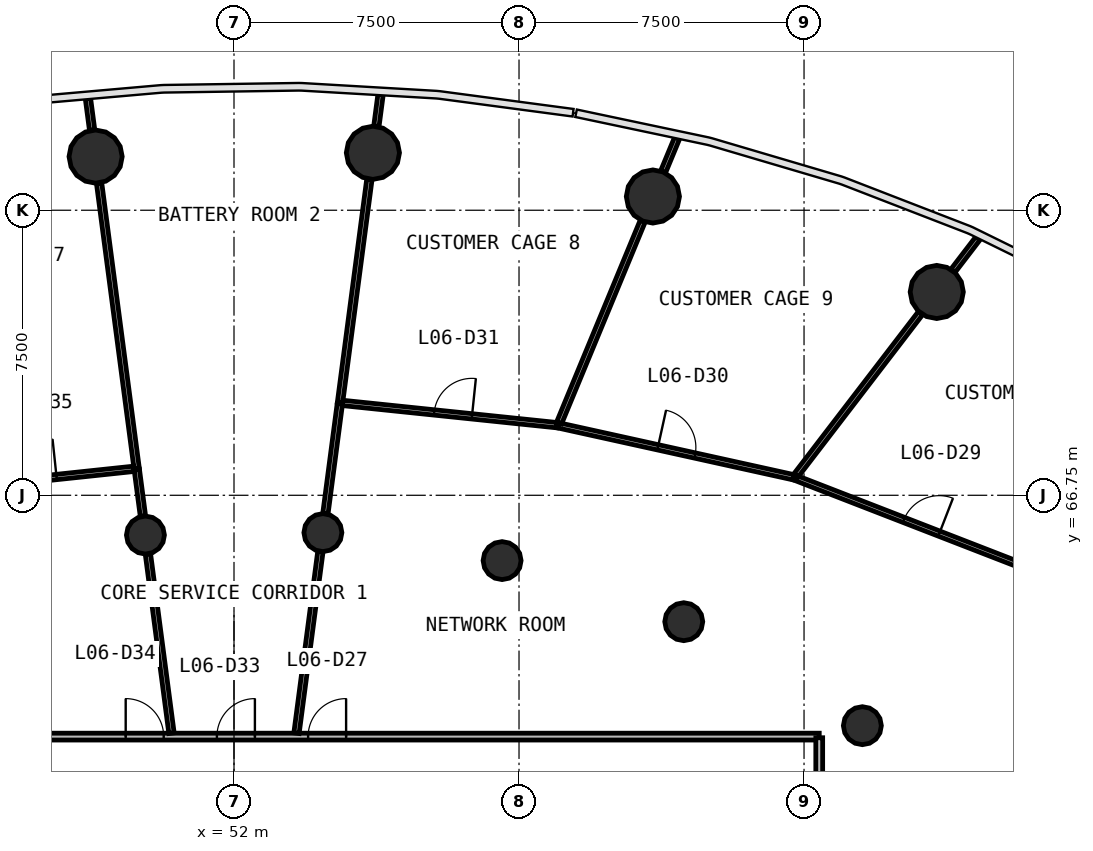
"""IFC4 building model, lengths in metres.
Left out: names, types, materials, properties, quantities, classifications, styles, units other than length and angle.
Written with IfcOpenShell. Run it as: python <this file> out.ifc"""

import sys

from ifc_helpers import new_model, si_unit, direction, frame, frame_2d, origin, origin_2d, place, context, subcontext, project, spatial, rectangle, circle, extrude, source, transform, mapped, element, fill, save


model = new_model("IFC4")
c1 = context("Model", 3, precision=1e-05, world=origin(), true_north=direction((0.0, 1.0)))
c2 = subcontext(c1, "Body", "Model", "MODEL_VIEW")
j1 = project(units=[si_unit("LENGTHUNIT", "METRE"), si_unit("PLANEANGLEUNIT", "RADIAN")], contexts=[c1])
p1 = place(None, origin())
s1 = spatial("IfcSite", under=j1, at=p1, CompositionType="ELEMENT")
p2 = place(p1, origin())
s2 = spatial("IfcBuilding", under=s1, at=p2, CompositionType="ELEMENT")
p3 = place(p2, frame((0.0, 0.0, 27.0)))
s3 = spatial("IfcBuildingStorey", under=s2, at=p3, CompositionType="ELEMENT", Elevation=27.0)
m1 = source(origin(), c2, "Body", "SweptSolid", [
    extrude(circle(Radius=0.7, at=origin_2d()), origin(), (0.0, 0.0, 1.0), 4.4),
])
for number, where, z_axis, x_axis in (
    (1, (70.492, 72.1, 0.0), (0.0, 0.0, 1.0), (1.0, 0.0, 0.0)),
    (2, (63.023, 74.611, 0.0), (0.0, 0.0, 1.0), (1.0, 0.0, 0.0)),
    (3, (55.655, 75.761, 0.0), (0.0, 0.0, 1.0), (1.0, 0.0, 0.0)),
    (4, (48.358, 75.661, 0.0), (0.0, 0.0, 1.0), (1.0, 0.0, 0.0)),
):
    element("IfcColumn", number, at=place(p3, frame(where, z_axis=z_axis, x_axis=x_axis)), inside=s3, PredefinedType="COLUMN", context=c2, shape_type="MappedRepresentation", body=[
        mapped(m1, transform((0.0, 0.0, 0.0), scale=1.0)),
    ])
m2 = source(origin(), c2, "Body", "SweptSolid", [
    extrude(circle(Radius=0.5, at=origin_2d()), origin(), (0.0, 0.0, 1.0), 4.4),
])
for number, where, z_axis, x_axis in (
    (5, (68.535, 60.688, 0.0), (0.0, 0.0, 1.0), (1.0, 0.0, 0.0)),
    (6, (63.835, 63.424, 0.0), (0.0, 0.0, 1.0), (1.0, 0.0, 0.0)),
    (7, (59.055, 65.031, 0.0), (0.0, 0.0, 1.0), (1.0, 0.0, 0.0)),
    (8, (54.339, 65.767, 0.0), (0.0, 0.0, 1.0), (1.0, 0.0, 0.0)),
    (9, (49.669, 65.703, 0.0), (0.0, 0.0, 1.0), (1.0, 0.0, 0.0)),
):
    element("IfcColumn", number, at=place(p3, frame(where, z_axis=z_axis, x_axis=x_axis)), inside=s3, PredefinedType="COLUMN", context=c2, shape_type="MappedRepresentation", body=[
        mapped(m2, transform((0.0, 0.0, 0.0), scale=1.0)),
    ])
p4 = place(p3, frame((36.6, 60.4, 0.0), z_axis=(0.0, 0.0, 1.0), x_axis=(1.0, 0.0, 0.0)))
e10 = element("IfcWall", 10, at=p4, inside=s3, PredefinedType="PARTITIONING", context=c2, shape_type="SweptSolid", body=[
    extrude(rectangle(XDim=30.8, YDim=0.18, at=frame_2d((15.4, 0.0))), origin(), (0.0, 0.0, 1.0), 3.05),
])
p5 = place(p4, frame((17.35, 0.0, 0.0)))
e11 = element("IfcOpeningElement", 11, at=p5, cuts=e10, PredefinedType="OPENING", context=c2, shape_type="SweptSolid", body=[
    extrude(rectangle(XDim=1.0, YDim=2.1, at=frame_2d((0.5, 1.05))), frame((0.0, 0.1, 0.0), z_axis=(0.0, -1.0, 0.0), x_axis=(1.0, 0.0, 0.0)), (0.0, 0.0, 1.0), 0.2),
])
p6 = place(p4, frame((14.95, 0.0, 0.0)))
e12 = element("IfcOpeningElement", 12, at=p6, cuts=e10, PredefinedType="OPENING", context=c2, shape_type="SweptSolid", body=[
    extrude(rectangle(XDim=1.0, YDim=2.1, at=frame_2d((0.5, 1.05))), frame((0.0, 0.1, 0.0), z_axis=(0.0, -1.0, 0.0), x_axis=(1.0, 0.0, 0.0)), (0.0, 0.0, 1.0), 0.2),
])
p7 = place(p4, frame((12.55, 0.0, 0.0)))
e13 = element("IfcOpeningElement", 13, at=p7, cuts=e10, PredefinedType="OPENING", context=c2, shape_type="SweptSolid", body=[
    extrude(rectangle(XDim=1.0, YDim=2.1, at=frame_2d((0.5, 1.05))), frame((0.0, 0.1, 0.0), z_axis=(0.0, -1.0, 0.0), x_axis=(1.0, 0.0, 0.0)), (0.0, 0.0, 1.0), 0.2),
])
p8 = place(p3, frame((67.4, 60.37, 0.0), z_axis=(0.0, 0.0, 1.0), x_axis=(0.0, -1.0, 0.0)))
e14 = element("IfcWall", 14, at=p8, inside=s3, PredefinedType="PARTITIONING", context=c2, shape_type="SweptSolid", body=[
    extrude(rectangle(XDim=23.583, YDim=0.18, at=frame_2d((11.791, 0.0))), origin(), (0.0, 0.0, 1.0), 3.05),
])
p9 = place(p8, frame((11.833, 0.0, 0.0)))
e15 = element("IfcOpeningElement", 15, at=p9, cuts=e14, PredefinedType="OPENING", context=c2, shape_type="SweptSolid", body=[
    extrude(rectangle(XDim=0.9, YDim=2.1, at=frame_2d((0.45, 1.05))), frame((0.0, 0.1, 0.0), z_axis=(0.0, -1.0, 0.0), x_axis=(1.0, 0.0, 0.0)), (0.0, 0.0, 1.0), 0.2),
])
p10 = place(p8, frame((10.433, 0.0, 0.0)))
e16 = element("IfcOpeningElement", 16, at=p10, cuts=e14, PredefinedType="OPENING", context=c2, shape_type="SweptSolid", body=[
    extrude(rectangle(XDim=0.9, YDim=2.1, at=frame_2d((0.45, 1.05))), frame((0.0, 0.1, 0.0), z_axis=(0.0, -1.0, 0.0), x_axis=(1.0, 0.0, 0.0)), (0.0, 0.0, 1.0), 0.2),
])
p11 = place(p8, frame((7.833, 0.0, 0.0)))
e17 = element("IfcOpeningElement", 17, at=p11, cuts=e14, PredefinedType="OPENING", context=c2, shape_type="SweptSolid", body=[
    extrude(rectangle(XDim=0.9, YDim=2.1, at=frame_2d((0.45, 1.05))), frame((0.0, 0.1, 0.0), z_axis=(0.0, -1.0, 0.0), x_axis=(1.0, 0.0, 0.0)), (0.0, 0.0, 1.0), 0.2),
])
p12 = place(p8, frame((19.133, 0.0, 0.0)))
e18 = element("IfcOpeningElement", 18, at=p12, cuts=e14, PredefinedType="OPENING", context=c2, shape_type="SweptSolid", body=[
    extrude(rectangle(XDim=1.0, YDim=2.1, at=frame_2d((0.5, 1.05))), frame((0.0, 0.1, 0.0), z_axis=(0.0, -1.0, 0.0), x_axis=(1.0, 0.0, 0.0)), (0.0, 0.0, 1.0), 0.2),
])
p13 = place(p8, frame((14.732, 0.0, 0.0)))
e19 = element("IfcOpeningElement", 19, at=p13, cuts=e14, PredefinedType="OPENING", context=c2, shape_type="SweptSolid", body=[
    extrude(rectangle(XDim=1.0, YDim=2.1, at=frame_2d((0.5, 1.05))), frame((0.0, 0.1, 0.0), z_axis=(0.0, -1.0, 0.0), x_axis=(1.0, 0.0, 0.0)), (0.0, 0.0, 1.0), 0.2),
])
p14 = place(p3, frame((49.439, 67.454, 0.0), z_axis=(0.0, 0.0, 1.0), x_axis=(-0.130518718584, 0.991445845268, 0.0)))
e20 = element("IfcWall", 20, at=p14, inside=s3, PredefinedType="PARTITIONING", context=c2, shape_type="SweptSolid", body=[
    extrude(rectangle(XDim=7.574, YDim=0.14, at=frame_2d((3.787, 0.0))), origin(), (0.0, 0.0, 1.0), 3.05),
])
p15 = place(p3, frame((66.747, 67.219, 0.0), z_axis=(0.0, 0.0, 1.0), x_axis=(0.932284149261, -0.361726782305, 0.0)))
e21 = element("IfcWall", 21, at=p15, inside=s3, PredefinedType="PARTITIONING", context=c2, shape_type="SweptSolid", body=[
    extrude(rectangle(XDim=7.337, YDim=0.14, at=frame_2d((3.668, 0.0))), origin(), (0.0, 0.0, 1.0), 3.05),
])
p16 = place(p15, frame((3.087, 0.0, 0.0)))
e22 = element("IfcOpeningElement", 22, at=p16, cuts=e21, PredefinedType="OPENING", context=c2, shape_type="SweptSolid", body=[
    extrude(rectangle(XDim=1.0, YDim=2.1, at=frame_2d((0.5, 1.05))), frame((0.0, 0.08, 0.0), z_axis=(0.0, -1.0, 0.0), x_axis=(1.0, 0.0, 0.0)), (0.0, 0.0, 1.0), 0.16),
])
p17 = place(p3, frame((60.529, 68.591, 0.0), z_axis=(0.0, 0.0, 1.0), x_axis=(0.976496953748, -0.21553120266, 0.0)))
e23 = element("IfcWall", 23, at=p17, inside=s3, PredefinedType="PARTITIONING", context=c2, shape_type="SweptSolid", body=[
    extrude(rectangle(XDim=6.338, YDim=0.14, at=frame_2d((3.169, 0.0))), origin(), (0.0, 0.0, 1.0), 3.05),
])
p18 = place(p17, frame((2.688, 0.0, 0.0)))
e24 = element("IfcOpeningElement", 24, at=p18, cuts=e23, PredefinedType="OPENING", context=c2, shape_type="SweptSolid", body=[
    extrude(rectangle(XDim=1.0, YDim=2.1, at=frame_2d((0.5, 1.05))), frame((0.0, 0.08, 0.0), z_axis=(0.0, -1.0, 0.0), x_axis=(1.0, 0.0, 0.0)), (0.0, 0.0, 1.0), 0.16),
])
p19 = place(p3, frame((54.789, 69.187, 0.0), z_axis=(0.0, 0.0, 1.0), x_axis=(0.130536559076, 0.991443496496, 0.0)))
e25 = element("IfcWall", 25, at=p19, inside=s3, PredefinedType="PARTITIONING", context=c2, shape_type="SweptSolid", body=[
    extrude(rectangle(XDim=5.927, YDim=0.14, at=frame_2d((2.963, 0.0))), origin(), (0.0, 0.0, 1.0), 3.05),
])
p20 = place(p3, frame((60.556, 68.657, 0.0), z_axis=(0.0, 0.0, 1.0), x_axis=(0.382663574121, 0.923887757815, 0.0)))
e26 = element("IfcWall", 26, at=p20, inside=s3, PredefinedType="PARTITIONING", context=c2, shape_type="SweptSolid", body=[
    extrude(rectangle(XDim=5.74, YDim=0.14, at=frame_2d((2.87, 0.0))), origin(), (0.0, 0.0, 1.0), 3.05),
])
p21 = place(p3, frame((54.859, 69.18, 0.0), z_axis=(0.0, 0.0, 1.0), x_axis=(0.994651908079, -0.103283985953, 0.0)))
e27 = element("IfcWall", 27, at=p21, inside=s3, PredefinedType="PARTITIONING", context=c2, shape_type="SweptSolid", body=[
    extrude(rectangle(XDim=5.671, YDim=0.14, at=frame_2d((2.835, 0.0))), origin(), (0.0, 0.0, 1.0), 3.05),
])
p22 = place(p21, frame((2.421, 0.0, 0.0)))
e28 = element("IfcOpeningElement", 28, at=p22, cuts=e27, PredefinedType="OPENING", context=c2, shape_type="SweptSolid", body=[
    extrude(rectangle(XDim=1.0, YDim=2.1, at=frame_2d((0.5, 1.05))), frame((0.0, 0.08, 0.0), z_axis=(0.0, -1.0, 0.0), x_axis=(1.0, 0.0, 0.0)), (0.0, 0.0, 1.0), 0.16),
])
p23 = place(p3, frame((66.792, 67.277, 0.0), z_axis=(0.0, 0.0, 1.0), x_axis=(0.608764273517, 0.793351157615, 0.0)))
e29 = element("IfcWall", 29, at=p23, inside=s3, PredefinedType="PARTITIONING", context=c2, shape_type="SweptSolid", body=[
    extrude(rectangle(XDim=5.375, YDim=0.14, at=frame_2d((2.688, 0.0))), origin(), (0.0, 0.0, 1.0), 3.05),
])
p24 = place(p3, frame((44.203, 66.9, 0.0), z_axis=(0.0, 0.0, 1.0), x_axis=(0.994449435574, 0.105215588614, 0.0)))
e30 = element("IfcWall", 30, at=p24, inside=s3, PredefinedType="PARTITIONING", context=c2, shape_type="SweptSolid", body=[
    extrude(rectangle(XDim=5.195, YDim=0.14, at=frame_2d((2.598, 0.0))), origin(), (0.0, 0.0, 1.0), 3.05),
])
p25 = place(p24, frame((2.146, 0.0, 0.0)))
e31 = element("IfcOpeningElement", 31, at=p25, cuts=e30, PredefinedType="OPENING", context=c2, shape_type="SweptSolid", body=[
    extrude(rectangle(XDim=1.0, YDim=2.1, at=frame_2d((0.5, 1.05))), frame((0.0, 0.08, 0.0), z_axis=(0.0, -1.0, 0.0), x_axis=(1.0, 0.0, 0.0)), (0.0, 0.0, 1.0), 0.16),
])
p26 = place(p3, frame((53.644, 60.49, 0.0), z_axis=(0.0, 0.0, 1.0), x_axis=(0.130523979823, 0.991445152639, 0.0)))
e32 = element("IfcWall", 32, at=p26, inside=s3, PredefinedType="PARTITIONING", context=c2, shape_type="SweptSolid", body=[
    extrude(rectangle(XDim=4.818, YDim=0.14, at=frame_2d((2.409, 0.0))), origin(), (0.0, 0.0, 1.0), 3.05),
])
p27 = place(p3, frame((50.356, 60.49, 0.0), z_axis=(0.0, 0.0, 1.0), x_axis=(-0.130548834981, 0.991441880135, 0.0)))
e33 = element("IfcWall", 33, at=p27, inside=s3, PredefinedType="PARTITIONING", context=c2, shape_type="SweptSolid", body=[
    extrude(rectangle(XDim=4.754, YDim=0.14, at=frame_2d((2.377, 0.0))), origin(), (0.0, 0.0, 1.0), 3.05),
])
p28 = place(p3, frame((54.405, 66.267, 0.0), z_axis=(0.0, 0.0, 1.0), x_axis=(0.130484843212, 0.991450304197, 0.0)))
e34 = element("IfcWall", 34, at=p28, inside=s3, PredefinedType="PARTITIONING", context=c2, shape_type="SweptSolid", body=[
    extrude(rectangle(XDim=2.915, YDim=0.14, at=frame_2d((1.458, 0.0))), origin(), (0.0, 0.0, 1.0), 3.05),
])
p29 = place(p3, frame((49.604, 66.203, 0.0), z_axis=(0.0, 0.0, 1.0), x_axis=(-0.130449384216, 0.991454970313, 0.0)))
e35 = element("IfcWall", 35, at=p29, inside=s3, PredefinedType="PARTITIONING", context=c2, shape_type="SweptSolid", body=[
    extrude(rectangle(XDim=1.231, YDim=0.14, at=frame_2d((0.616, 0.0))), origin(), (0.0, 0.0, 1.0), 3.05),
])
p30 = place(p3, frame((70.921, 72.658, 0.0), z_axis=(0.0, 0.0, 1.0), x_axis=(0.60884531533, 0.793288965006, 0.0)))
e36 = element("IfcWall", 36, at=p30, inside=s3, PredefinedType="PARTITIONING", context=c2, shape_type="SweptSolid", body=[
    extrude(rectangle(XDim=1.077, YDim=0.14, at=frame_2d((0.539, 0.0))), origin(), (0.0, 0.0, 1.0), 3.05),
])
p31 = place(p3, frame((63.292, 75.263, 0.0), z_axis=(0.0, 0.0, 1.0), x_axis=(0.382814514464, 0.923825225633, 0.0)))
e37 = element("IfcWall", 37, at=p31, inside=s3, PredefinedType="PARTITIONING", context=c2, shape_type="SweptSolid", body=[
    extrude(rectangle(XDim=0.963, YDim=0.14, at=frame_2d((0.481, 0.0))), origin(), (0.0, 0.0, 1.0), 3.05),
])
p32 = place(p3, frame((55.747, 76.46, 0.0), z_axis=(0.0, 0.0, 1.0), x_axis=(0.1304619789, 0.991453313102, 0.0)))
e38 = element("IfcWall", 38, at=p32, inside=s3, PredefinedType="PARTITIONING", context=c2, shape_type="SweptSolid", body=[
    extrude(rectangle(XDim=0.846, YDim=0.14, at=frame_2d((0.423, 0.0))), origin(), (0.0, 0.0, 1.0), 3.05),
])
p33 = place(p3, frame((48.266, 76.36, 0.0), z_axis=(0.0, 0.0, 1.0), x_axis=(-0.130342122338, 0.991469077251, 0.0)))
e39 = element("IfcWall", 39, at=p33, inside=s3, PredefinedType="PARTITIONING", context=c2, shape_type="SweptSolid", body=[
    extrude(rectangle(XDim=0.843, YDim=0.14, at=frame_2d((0.421, 0.0))), origin(), (0.0, 0.0, 1.0), 3.05),
])
m3 = source(origin(), c2, "Body", "SweptSolid", [
    extrude(rectangle(XDim=1.0, YDim=2.1, at=frame_2d((0.5, 1.05))), frame((0.0, 0.025, 0.0), z_axis=(0.0, -1.0, 0.0), x_axis=(1.0, 0.0, 0.0)), (0.0, 0.0, 1.0), 0.05),
])
p34 = place(p5, origin())
e40 = element("IfcDoor", 40, at=p34, inside=s3, OperationType="SINGLE_SWING_RIGHT", PredefinedType="DOOR", context=c2, shape_type="MappedRepresentation", body=[
    mapped(m3, transform((0.0, 0.0, 0.0), scale=1.0)),
])
fill(e11, e40)
p35 = place(p16, origin())
e41 = element("IfcDoor", 41, at=p35, inside=s3, OperationType="SINGLE_SWING_RIGHT", PredefinedType="DOOR", context=c2, shape_type="MappedRepresentation", body=[
    mapped(m3, transform((0.0, 0.0, 0.0), scale=1.0)),
])
fill(e22, e41)
p36 = place(p18, origin())
e42 = element("IfcDoor", 42, at=p36, inside=s3, OperationType="SINGLE_SWING_LEFT", PredefinedType="DOOR", context=c2, shape_type="MappedRepresentation", body=[
    mapped(m3, transform((0.0, 0.0, 0.0), scale=1.0)),
])
fill(e24, e42)
p37 = place(p22, origin())
e43 = element("IfcDoor", 43, at=p37, inside=s3, OperationType="SINGLE_SWING_RIGHT", PredefinedType="DOOR", context=c2, shape_type="MappedRepresentation", body=[
    mapped(m3, transform((0.0, 0.0, 0.0), scale=1.0)),
])
fill(e28, e43)
p38 = place(p6, origin())
e44 = element("IfcDoor", 44, at=p38, inside=s3, OperationType="SINGLE_SWING_RIGHT", PredefinedType="DOOR", context=c2, shape_type="MappedRepresentation", body=[
    mapped(m3, transform((0.0, 0.0, 0.0), scale=1.0)),
])
fill(e12, e44)
p39 = place(p7, origin())
e45 = element("IfcDoor", 45, at=p39, inside=s3, OperationType="SINGLE_SWING_LEFT", PredefinedType="DOOR", context=c2, shape_type="MappedRepresentation", body=[
    mapped(m3, transform((0.0, 0.0, 0.0), scale=1.0)),
])
fill(e13, e45)
p40 = place(p25, origin())
e46 = element("IfcDoor", 46, at=p40, inside=s3, OperationType="SINGLE_SWING_RIGHT", PredefinedType="DOOR", context=c2, shape_type="MappedRepresentation", body=[
    mapped(m3, transform((0.0, 0.0, 0.0), scale=1.0)),
])
fill(e31, e46)
save(model, sys.argv[1])
